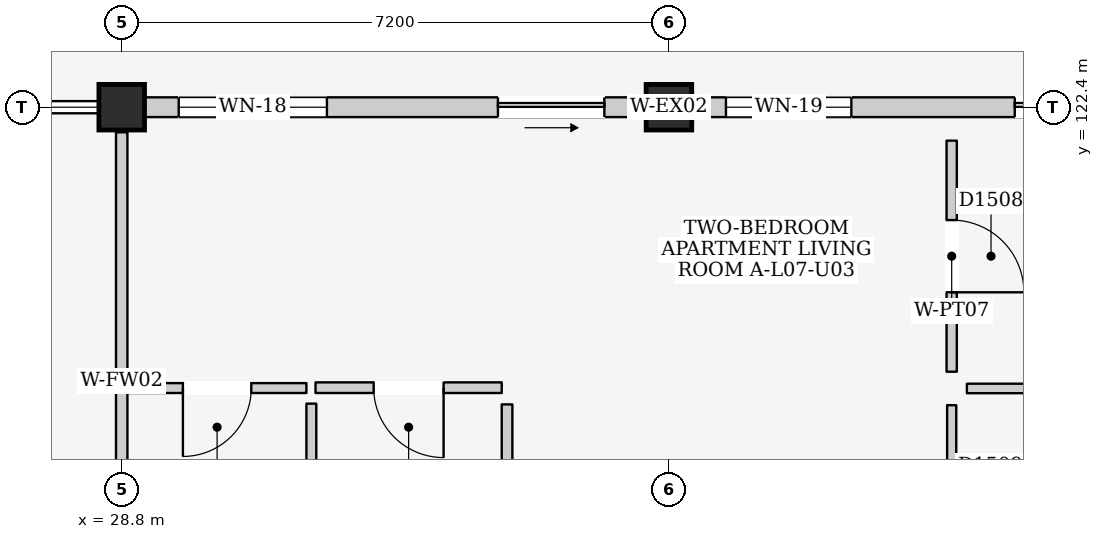
"""IFC4 building model, lengths in metres.
Left out: names, types, materials, properties, quantities, classifications, styles, units other than length and angle.
Written with IfcOpenShell. Run it as: python <this file> out.ifc"""

import sys

from ifc_helpers import new_model, si_unit, direction, frame, frame_2d, origin, origin_2d, place, context, subcontext, project, spatial, rectangle, extrude, element, fill, save


model = new_model("IFC4")
c1 = context("Model", 3, precision=1e-05, world=origin(), true_north=direction((0.0, 1.0)))
c2 = subcontext(c1, "Body", "Model", "MODEL_VIEW")
j1 = project(units=[si_unit("LENGTHUNIT", "METRE"), si_unit("PLANEANGLEUNIT", "RADIAN")], contexts=[c1])
p1 = place(None, origin())
s1 = spatial("IfcSite", under=j1, at=p1, CompositionType="ELEMENT")
p2 = place(p1, origin())
s2 = spatial("IfcBuilding", under=s1, at=p2, CompositionType="ELEMENT")
p3 = place(p2, frame((0.0, 0.0, 25.1)))
s3 = spatial("IfcBuildingStorey", under=s2, at=p3, CompositionType="ELEMENT", Elevation=25.1)
for number, where, z_axis, x_axis in (
    (1, (28.8, 122.4, 0.0), (0.0, 0.0, 1.0), (1.0, 0.0, 0.0)),
    (2, (36.0, 122.4, 0.0), (0.0, 0.0, 1.0), (1.0, 0.0, 0.0)),
):
    element("IfcColumn", number, at=place(p3, frame(where, z_axis=z_axis, x_axis=x_axis)), inside=s3, PredefinedType="COLUMN", context=c2, shape_type="SweptSolid", body=[
        extrude(rectangle(XDim=0.6, YDim=0.6, at=origin_2d()), origin(), (0.0, 0.0, 1.0), 3.2),
    ])
p4 = place(p3, frame((29.1, 122.4, 0.0), z_axis=(0.0, 0.0, 1.0), x_axis=(1.0, 0.0, 0.0)))
e3 = element("IfcWall", 3, at=p4, inside=s3, PredefinedType="ELEMENTEDWALL", context=c2, shape_type="SweptSolid", body=[
    extrude(rectangle(XDim=6.6, YDim=0.26, at=frame_2d((3.3, 0.0))), origin(), (0.0, 0.0, 1.0), 2.525),
])
p5 = place(p4, frame((4.65, 0.0, 0.0)))
e4 = element("IfcOpeningElement", 4, at=p5, cuts=e3, PredefinedType="OPENING", context=c2, shape_type="SweptSolid", body=[
    extrude(rectangle(XDim=1.4, YDim=2.1, at=frame_2d((0.7, 1.05))), frame((0.0, 0.145, 0.0), z_axis=(0.0, -1.0, 0.0), x_axis=(1.0, 0.0, 0.0)), (0.0, 0.0, 1.0), 0.29),
])
p6 = place(p4, frame((0.45, 0.0, 0.865)))
e5 = element("IfcOpeningElement", 5, at=p6, cuts=e3, PredefinedType="OPENING", context=c2, shape_type="SweptSolid", body=[
    extrude(rectangle(XDim=1.95, YDim=1.55, at=frame_2d((0.975, 0.775))), frame((0.0, 0.145, 0.0), z_axis=(0.0, -1.0, 0.0), x_axis=(1.0, 0.0, 0.0)), (0.0, 0.0, 1.0), 0.29),
])
p7 = place(p3, frame((36.3, 122.4, 0.0), z_axis=(0.0, 0.0, 1.0), x_axis=(1.0, 0.0, 0.0)))
e6 = element("IfcWall", 6, at=p7, inside=s3, PredefinedType="ELEMENTEDWALL", context=c2, shape_type="SweptSolid", body=[
    extrude(rectangle(XDim=6.6, YDim=0.26, at=frame_2d((3.3, 0.0))), origin(), (0.0, 0.0, 1.0), 2.525),
])
p8 = place(p7, frame((4.25, 0.0, 0.0)))
e7 = element("IfcOpeningElement", 7, at=p8, cuts=e6, PredefinedType="OPENING", context=c2, shape_type="SweptSolid", body=[
    extrude(rectangle(XDim=1.8, YDim=2.12, at=frame_2d((0.9, 1.06))), frame((0.0, 0.145, 0.0), z_axis=(0.0, -1.0, 0.0), x_axis=(1.0, 0.0, 0.0)), (0.0, 0.0, 1.0), 0.29),
])
p9 = place(p7, frame((0.45, 0.0, 0.9)))
e8 = element("IfcOpeningElement", 8, at=p9, cuts=e6, PredefinedType="OPENING", context=c2, shape_type="SweptSolid", body=[
    extrude(rectangle(XDim=1.65, YDim=1.35, at=frame_2d((0.825, 0.675))), frame((0.0, 0.145, 0.0), z_axis=(0.0, -1.0, 0.0), x_axis=(1.0, 0.0, 0.0)), (0.0, 0.0, 1.0), 0.29),
])
p10 = place(p3, frame((28.8, 115.53, 0.0), z_axis=(0.0, 0.0, 1.0), x_axis=(0.0, 1.0, 0.0)))
e9 = element("IfcWall", 9, at=p10, inside=s3, PredefinedType="PARTITIONING", context=c2, shape_type="SweptSolid", body=[
    extrude(rectangle(XDim=6.54, YDim=0.15, at=frame_2d((3.27, 0.0))), origin(), (0.0, 0.0, 1.0), 2.475),
])
p11 = place(p3, frame((28.88, 118.705, 0.0), z_axis=(0.0, 0.0, 1.0), x_axis=(1.0, 0.0, 0.0)))
e10 = element("IfcWall", 10, at=p11, inside=s3, PredefinedType="PARTITIONING", context=c2, shape_type="SweptSolid", body=[
    extrude(rectangle(XDim=2.35, YDim=0.13, at=frame_2d((1.175, 0.0))), origin(), (0.0, 0.0, 1.0), 2.99),
])
p12 = place(p11, frame((0.725, 0.0, 0.0)))
e11 = element("IfcOpeningElement", 11, at=p12, cuts=e10, PredefinedType="OPENING", context=c2, shape_type="SweptSolid", body=[
    extrude(rectangle(XDim=0.9, YDim=2.1, at=frame_2d((0.45, 1.05))), frame((0.0, 0.08, 0.0), z_axis=(0.0, -1.0, 0.0), x_axis=(1.0, 0.0, 0.0)), (0.0, 0.0, 1.0), 0.16),
])
p13 = place(p3, frame((31.295, 115.46, 0.0), z_axis=(0.0, 0.0, 1.0), x_axis=(0.0, 1.0, 0.0)))
e12 = element("IfcWall", 12, at=p13, inside=s3, PredefinedType="PARTITIONING", context=c2, shape_type="SweptSolid", body=[
    extrude(rectangle(XDim=3.04, YDim=0.13, at=frame_2d((1.52, 0.0))), origin(), (0.0, 0.0, 1.0), 2.99),
])
p14 = place(p3, frame((31.35, 118.71, 0.0), z_axis=(0.0, 0.0, 1.0), x_axis=(1.0, 0.0, 0.0)))
e13 = element("IfcWall", 13, at=p14, inside=s3, PredefinedType="PARTITIONING", context=c2, shape_type="SweptSolid", body=[
    extrude(rectangle(XDim=2.45, YDim=0.14, at=frame_2d((1.225, 0.0))), origin(), (0.0, 0.0, 1.0), 2.99),
])
p15 = place(p14, frame((0.765, 0.0, 0.0)))
e14 = element("IfcOpeningElement", 14, at=p15, cuts=e13, PredefinedType="OPENING", context=c2, shape_type="SweptSolid", body=[
    extrude(rectangle(XDim=0.92, YDim=2.1, at=frame_2d((0.46, 1.05))), frame((0.0, 0.085, 0.0), z_axis=(0.0, -1.0, 0.0), x_axis=(1.0, 0.0, 0.0)), (0.0, 0.0, 1.0), 0.17),
])
p16 = place(p3, frame((33.87, 115.43, 0.0), z_axis=(0.0, 0.0, 1.0), x_axis=(0.0, 1.0, 0.0)))
e15 = element("IfcWall", 15, at=p16, inside=s3, PredefinedType="PARTITIONING", context=c2, shape_type="SweptSolid", body=[
    extrude(rectangle(XDim=3.06, YDim=0.14, at=frame_2d((1.53, 0.0))), origin(), (0.0, 0.0, 1.0), 2.99),
])
p17 = place(p3, frame((39.72, 118.92, 0.0), z_axis=(0.0, 0.0, 1.0), x_axis=(0.0, 1.0, 0.0)))
e16 = element("IfcWall", 16, at=p17, inside=s3, PredefinedType="PARTITIONING", context=c2, shape_type="SweptSolid", body=[
    extrude(rectangle(XDim=3.04, YDim=0.135, at=frame_2d((1.52, 0.0))), origin(), (0.0, 0.0, 1.0), 2.99),
])
p18 = place(p17, frame((1.045, 0.0, 0.0)))
e17 = element("IfcOpeningElement", 17, at=p18, cuts=e16, PredefinedType="OPENING", context=c2, shape_type="SweptSolid", body=[
    extrude(rectangle(XDim=0.95, YDim=2.15, at=frame_2d((0.475, 1.075))), frame((0.0, 0.083, 0.0), z_axis=(0.0, -1.0, 0.0), x_axis=(1.0, 0.0, 0.0)), (0.0, 0.0, 1.0), 0.165),
])
p19 = place(p3, frame((39.92, 118.7, 0.0), z_axis=(0.0, 0.0, 1.0), x_axis=(1.0, 0.0, 0.0)))
e18 = element("IfcWall", 18, at=p19, inside=s3, PredefinedType="PARTITIONING", context=c2, shape_type="SweptSolid", body=[
    extrude(rectangle(XDim=3.06, YDim=0.125, at=frame_2d((1.53, 0.0))), origin(), (0.0, 0.0, 1.0), 2.99),
])
p20 = place(p3, frame((39.72, 115.44, 0.0), z_axis=(0.0, 0.0, 1.0), x_axis=(0.0, 1.0, 0.0)))
e19 = element("IfcWall", 19, at=p20, inside=s3, PredefinedType="PARTITIONING", context=c2, shape_type="SweptSolid", body=[
    extrude(rectangle(XDim=3.04, YDim=0.12, at=frame_2d((1.52, 0.0))), origin(), (0.0, 0.0, 1.0), 2.99),
])
p21 = place(p20, frame((1.04, 0.0, 0.0)))
e20 = element("IfcOpeningElement", 20, at=p21, cuts=e19, PredefinedType="OPENING", context=c2, shape_type="SweptSolid", body=[
    extrude(rectangle(XDim=0.96, YDim=2.15, at=frame_2d((0.48, 1.075))), frame((0.0, 0.075, 0.0), z_axis=(0.0, -1.0, 0.0), x_axis=(1.0, 0.0, 0.0)), (0.0, 0.0, 1.0), 0.15),
])
p22 = place(p5, frame((1.4, 0.0, 0.0), z_axis=(0.0, 0.0, 1.0), x_axis=(-1.0, 0.0, 0.0)))
e21 = element("IfcDoor", 21, at=p22, inside=s3, OperationType="SLIDING_TO_RIGHT", PredefinedType="DOOR", context=c2, shape_type="SweptSolid", body=[
    extrude(rectangle(XDim=1.4, YDim=2.1, at=frame_2d((0.7, 1.05))), frame((0.0, 0.025, 0.0), z_axis=(0.0, -1.0, 0.0), x_axis=(1.0, 0.0, 0.0)), (0.0, 0.0, 1.0), 0.05),
])
fill(e4, e21)
p23 = place(p6, origin())
e22 = element("IfcWindow", 22, at=p23, inside=s3, PartitioningType="DOUBLE_PANEL_VERTICAL", PredefinedType="WINDOW", context=c2, shape_type="SweptSolid", body=[
    extrude(rectangle(XDim=1.95, YDim=1.55, at=frame_2d((0.975, 0.775))), frame((0.0, 0.03, 0.0), z_axis=(0.0, -1.0, 0.0), x_axis=(1.0, 0.0, 0.0)), (0.0, 0.0, 1.0), 0.06),
])
fill(e5, e22)
p24 = place(p8, frame((1.8, 0.0, 0.0), z_axis=(0.0, 0.0, 1.0), x_axis=(-1.0, 0.0, 0.0)))
e23 = element("IfcDoor", 23, at=p24, inside=s3, OperationType="SLIDING_TO_LEFT", PredefinedType="DOOR", context=c2, shape_type="SweptSolid", body=[
    extrude(rectangle(XDim=1.8, YDim=2.12, at=frame_2d((0.9, 1.06))), frame((0.0, 0.025, 0.0), z_axis=(0.0, -1.0, 0.0), x_axis=(1.0, 0.0, 0.0)), (0.0, 0.0, 1.0), 0.05),
])
fill(e7, e23)
p25 = place(p9, origin())
e24 = element("IfcWindow", 24, at=p25, inside=s3, PartitioningType="DOUBLE_PANEL_VERTICAL", PredefinedType="WINDOW", context=c2, shape_type="SweptSolid", body=[
    extrude(rectangle(XDim=1.65, YDim=1.35, at=frame_2d((0.825, 0.675))), frame((0.0, 0.03, 0.0), z_axis=(0.0, -1.0, 0.0), x_axis=(1.0, 0.0, 0.0)), (0.0, 0.0, 1.0), 0.06),
])
fill(e8, e24)
p26 = place(p12, frame((0.9, 0.0, 0.0), z_axis=(0.0, 0.0, 1.0), x_axis=(-1.0, 0.0, 0.0)))
e25 = element("IfcDoor", 25, at=p26, inside=s3, OperationType="SINGLE_SWING_RIGHT", PredefinedType="DOOR", context=c2, shape_type="SweptSolid", body=[
    extrude(rectangle(XDim=0.9, YDim=2.1, at=frame_2d((0.45, 1.05))), frame((0.0, 0.025, 0.0), z_axis=(0.0, -1.0, 0.0), x_axis=(1.0, 0.0, 0.0)), (0.0, 0.0, 1.0), 0.05),
])
fill(e11, e25)
p27 = place(p15, frame((0.92, 0.0, 0.0), z_axis=(0.0, 0.0, 1.0), x_axis=(-1.0, 0.0, 0.0)))
e26 = element("IfcDoor", 26, at=p27, inside=s3, OperationType="SINGLE_SWING_LEFT", PredefinedType="DOOR", context=c2, shape_type="SweptSolid", body=[
    extrude(rectangle(XDim=0.92, YDim=2.1, at=frame_2d((0.46, 1.05))), frame((0.0, 0.025, 0.0), z_axis=(0.0, -1.0, 0.0), x_axis=(1.0, 0.0, 0.0)), (0.0, 0.0, 1.0), 0.05),
])
fill(e14, e26)
p28 = place(p18, frame((0.95, 0.0, 0.0), z_axis=(0.0, 0.0, 1.0), x_axis=(-1.0, 0.0, 0.0)))
e27 = element("IfcDoor", 27, at=p28, inside=s3, OperationType="SINGLE_SWING_RIGHT", PredefinedType="DOOR", context=c2, shape_type="SweptSolid", body=[
    extrude(rectangle(XDim=0.95, YDim=2.15, at=frame_2d((0.475, 1.075))), frame((0.0, 0.025, 0.0), z_axis=(0.0, -1.0, 0.0), x_axis=(1.0, 0.0, 0.0)), (0.0, 0.0, 1.0), 0.05),
])
fill(e17, e27)
save(model, sys.argv[1])
